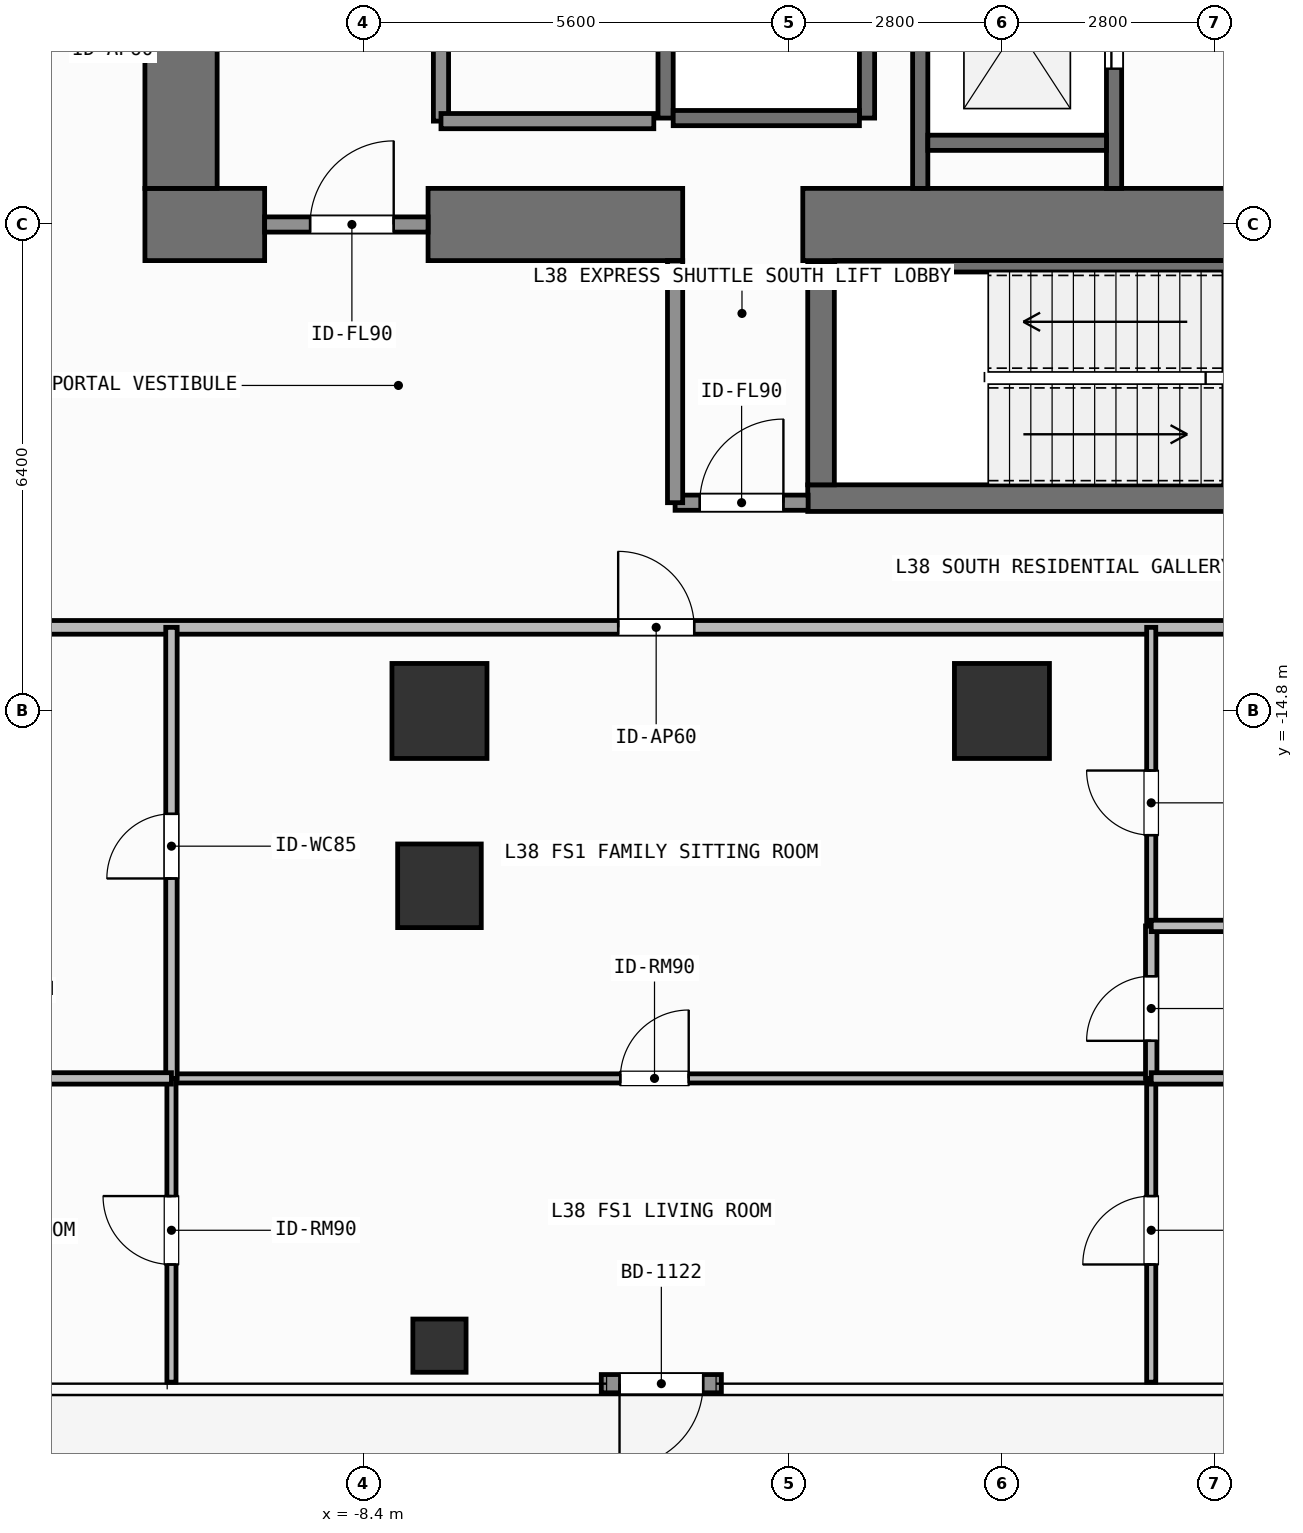
"""IFC4 building model, lengths in metres.
Left out: names, types, materials, properties, quantities, classifications, styles, units other than length and angle.
Written with IfcOpenShell. Run it as: python <this file> out.ifc"""

import sys

from ifc_helpers import new_model, si_unit, direction, frame, frame_2d, origin, origin_2d, place, context, subcontext, project, spatial, rectangle, hollow_rectangle, extrude, element, fill, save


model = new_model("IFC4")
c1 = context("Model", 3, precision=1e-05, world=origin(), true_north=direction((0.0, 1.0)))
c2 = subcontext(c1, "Body", "Model", "MODEL_VIEW")
j1 = project(units=[si_unit("LENGTHUNIT", "METRE"), si_unit("PLANEANGLEUNIT", "RADIAN")], contexts=[c1])
p1 = place(None, origin())
s1 = spatial("IfcSite", under=j1, at=p1, CompositionType="ELEMENT")
p2 = place(p1, origin())
s2 = spatial("IfcBuilding", under=s1, at=p2, CompositionType="ELEMENT")
p3 = place(p2, frame((0.0, 0.0, 152.4)))
s3 = spatial("IfcBuildingStorey", under=s2, at=p3, CompositionType="ELEMENT", Elevation=152.4)
p4 = place(p3, frame((-11.275, -8.4, 0.0), z_axis=(0.0, 0.0, 1.0), x_axis=(1.0, 0.0, 0.0)))
e1 = element("IfcWall", 1, at=p4, inside=s3, PredefinedType="SHEAR", context=c2, shape_type="SweptSolid", body=[
    extrude(rectangle(XDim=1.575, YDim=0.95, at=frame_2d((0.788, 0.0))), origin(), (0.0, 0.0, 1.0), 3.9),
])
p5 = place(p3, frame((-7.55, -8.4, 0.0), z_axis=(0.0, 0.0, 1.0), x_axis=(1.0, 0.0, 0.0)))
e2 = element("IfcWall", 2, at=p5, inside=s3, PredefinedType="SHEAR", context=c2, shape_type="SweptSolid", body=[
    extrude(rectangle(XDim=3.35, YDim=0.95, at=frame_2d((1.675, 0.0))), origin(), (0.0, 0.0, 1.0), 3.9),
])
p6 = place(p3, frame((-2.62, -8.4, 0.0), z_axis=(0.0, 0.0, 1.0), x_axis=(1.0, 0.0, 0.0)))
e3 = element("IfcWall", 3, at=p6, inside=s3, PredefinedType="SHEAR", context=c2, shape_type="SweptSolid", body=[
    extrude(rectangle(XDim=7.27, YDim=0.95, at=frame_2d((3.635, 0.0))), origin(), (0.0, 0.0, 1.0), 3.9),
])
p7 = place(p3, frame((-10.8, -7.925, 0.0), z_axis=(0.0, 0.0, 1.0), x_axis=(0.0, 1.0, 0.0)))
e4 = element("IfcWall", 4, at=p7, inside=s3, PredefinedType="SHEAR", context=c2, shape_type="SweptSolid", body=[
    extrude(rectangle(XDim=15.85, YDim=0.95, at=frame_2d((7.925, 0.0))), origin(), (0.0, 0.0, 1.0), 3.9),
])
p8 = place(p3, frame((-2.555, -12.0, 0.0), z_axis=(0.0, 0.0, 1.0), x_axis=(1.0, 0.0, 0.0)))
e5 = element("IfcWall", 5, at=p8, inside=s3, PredefinedType="SHEAR", context=c2, shape_type="SweptSolid", body=[
    extrude(rectangle(XDim=7.31, YDim=0.35, at=frame_2d((3.655, 0.0))), origin(), (0.0, 0.0, 1.0), 3.9),
])
p9 = place(p3, frame((-2.2, -8.95, 0.0), z_axis=(0.0, 0.0, 1.0), x_axis=(1.0, 0.0, 0.0)))
e6 = element("IfcWall", 6, at=p9, inside=s3, PredefinedType="SHEAR", context=c2, shape_type="SweptSolid", body=[
    extrude(rectangle(XDim=6.6, YDim=0.15, at=frame_2d((3.3, 0.0))), origin(), (0.0, 0.0, 1.0), 3.9),
])
p10 = place(p3, frame((-2.38, -11.825, 0.0), z_axis=(0.0, 0.0, 1.0), x_axis=(0.0, 1.0, 0.0)))
e7 = element("IfcWall", 7, at=p10, inside=s3, PredefinedType="SHEAR", context=c2, shape_type="SweptSolid", body=[
    extrude(rectangle(XDim=2.925, YDim=0.35, at=frame_2d((1.462, 0.0))), origin(), (0.0, 0.0, 1.0), 3.9),
])
for number, where, z_axis, x_axis in (
    (8, (-7.4, -14.8, 0.0), (0.0, 0.0, 1.0), (1.0, 0.0, 0.0)),
    (9, (0.0, -14.8, 0.0), (0.0, 0.0, 1.0), (1.0, 0.0, 0.0)),
):
    element("IfcColumn", number, at=place(p3, frame(where, z_axis=z_axis, x_axis=x_axis)), inside=s3, PredefinedType="COLUMN", context=c2, shape_type="SweptSolid", body=[
        extrude(rectangle(XDim=1.25, YDim=1.25, at=origin_2d()), origin(), (0.0, 0.0, 1.0), 3.9),
    ])
p11 = place(p3, frame((-7.4, -17.1, 0.0), z_axis=(0.0, 0.0, 1.0), x_axis=(1.0, 0.0, 0.0)))
e10 = element("IfcColumn", 10, at=p11, inside=s3, PredefinedType="COLUMN", context=c2, shape_type="SweptSolid", body=[
    extrude(rectangle(XDim=1.1, YDim=1.1, at=origin_2d()), origin(), (0.0, 0.0, 1.0), 3.9),
])
p12 = place(p3, frame((-7.4, -23.15, 0.0), z_axis=(0.0, 0.0, 1.0), x_axis=(1.0, 0.0, 0.0)))
e11 = element("IfcColumn", 11, at=p12, inside=s3, PredefinedType="COLUMN", context=c2, shape_type="SweptSolid", body=[
    extrude(hollow_rectangle(XDim=0.7, YDim=0.7, WallThickness=0.032, at=origin_2d()), origin(), (0.0, 0.0, 1.0), 3.9),
])
p13 = place(p3, frame((-3.691, -23.65, 0.0), z_axis=(0.0, 0.0, 1.0), x_axis=(-1.0, 0.0, 0.0)))
e12 = element("IfcWall", 12, at=p13, inside=s3, PredefinedType="SOLIDWALL", context=c2, shape_type="SweptSolid", body=[
    extrude(rectangle(XDim=1.58, YDim=0.24, at=frame_2d((0.79, 0.0))), origin(), (0.0, 0.0, 1.0), 3.6),
])
p14 = place(p13, frame((0.24, 0.0, 0.0)))
e13 = element("IfcOpeningElement", 13, at=p14, cuts=e12, PredefinedType="OPENING", context=c2, shape_type="SweptSolid", body=[
    extrude(rectangle(XDim=1.1, YDim=2.2, at=frame_2d((0.55, 1.1))), frame((0.0, 0.13, 0.0), z_axis=(0.0, -1.0, 0.0), x_axis=(1.0, 0.0, 0.0)), (0.0, 0.0, 1.0), 0.26),
])
for number, where, z_axis, x_axis in (
    (14, (-4.425, -7.0, 0.0), (0.0, 0.0, 1.0), (0.0, 1.0, 0.0)),
    (15, (-1.775, -7.0, 0.0), (0.0, 0.0, 1.0), (0.0, 1.0, 0.0)),
):
    element("IfcWall", number, at=place(p3, frame(where, z_axis=z_axis, x_axis=x_axis)), inside=s3, PredefinedType="SHEAR", context=c2, shape_type="SweptSolid", body=[
        extrude(rectangle(XDim=2.8, YDim=0.2, at=frame_2d((1.4, 0.0))), origin(), (0.0, 0.0, 1.0), 3.6),
    ])
p15 = place(p3, frame((-4.325, -7.0, 0.0), z_axis=(0.0, 0.0, 1.0), x_axis=(1.0, 0.0, 0.0)))
e16 = element("IfcWall", 16, at=p15, inside=s3, PredefinedType="SHEAR", context=c2, shape_type="SweptSolid", body=[
    extrude(rectangle(XDim=2.45, YDim=0.2, at=frame_2d((1.225, 0.0))), origin(), (0.0, 0.0, 1.0), 3.6),
])
p16 = place(p3, frame((-1.075, -7.925, 0.0), z_axis=(0.0, 0.0, 1.0), x_axis=(0.0, 1.0, 0.0)))
e17 = element("IfcWall", 17, at=p16, inside=s3, PredefinedType="SHEAR", context=c2, shape_type="SweptSolid", body=[
    extrude(rectangle(XDim=3.65, YDim=0.2, at=frame_2d((1.825, 0.0))), origin(), (0.0, 0.0, 1.0), 3.6),
])
p17 = place(p3, frame((1.475, -7.925, 0.0), z_axis=(0.0, 0.0, 1.0), x_axis=(0.0, 1.0, 0.0)))
e18 = element("IfcWall", 18, at=p17, inside=s3, PredefinedType="SHEAR", context=c2, shape_type="SweptSolid", body=[
    extrude(rectangle(XDim=3.65, YDim=0.2, at=frame_2d((1.825, 0.0))), origin(), (0.0, 0.0, 1.0), 3.6),
])
p18 = place(p17, frame((1.575, 0.0, 0.0)))
e19 = element("IfcOpeningElement", 19, at=p18, cuts=e18, PredefinedType="OPENING", context=c2, shape_type="SweptSolid", body=[
    extrude(rectangle(XDim=1.1, YDim=2.2, at=frame_2d((0.55, 1.1))), frame((0.0, 0.11, 0.0), z_axis=(0.0, -1.0, 0.0), x_axis=(1.0, 0.0, 0.0)), (0.0, 0.0, 1.0), 0.22),
])
p19 = place(p3, frame((-0.975, -7.325, 0.0), z_axis=(0.0, 0.0, 1.0), x_axis=(1.0, 0.0, 0.0)))
e20 = element("IfcWall", 20, at=p19, inside=s3, PredefinedType="SHEAR", context=c2, shape_type="SweptSolid", body=[
    extrude(rectangle(XDim=2.35, YDim=0.2, at=frame_2d((1.175, 0.0))), origin(), (0.0, 0.0, 1.0), 3.6),
])
p20 = place(p3, frame((-9.7, -8.4, 0.0), z_axis=(0.0, 0.0, 1.0), x_axis=(1.0, 0.0, 0.0)))
e21 = element("IfcWall", 21, at=p20, inside=s3, PredefinedType="SOLIDWALL", context=c2, shape_type="SweptSolid", body=[
    extrude(rectangle(XDim=2.15, YDim=0.2, at=frame_2d((1.075, 0.0))), origin(), (0.0, 0.0, 1.0), 2.64),
])
p21 = place(p20, frame((0.598, 0.0, 0.0)))
e22 = element("IfcOpeningElement", 22, at=p21, cuts=e21, PredefinedType="OPENING", context=c2, shape_type="SweptSolid", body=[
    extrude(rectangle(XDim=1.1, YDim=2.15, at=frame_2d((0.55, 1.075))), frame((0.0, 0.11, 0.0), z_axis=(0.0, -1.0, 0.0), x_axis=(1.0, 0.0, 0.0)), (0.0, 0.0, 1.0), 0.22),
])
p22 = place(p3, frame((-4.3, -12.06, 0.0), z_axis=(0.0, 0.0, 1.0), x_axis=(1.0, 0.0, 0.0)))
e23 = element("IfcWall", 23, at=p22, inside=s3, PredefinedType="SOLIDWALL", context=c2, shape_type="SweptSolid", body=[
    extrude(rectangle(XDim=1.75, YDim=0.2, at=frame_2d((0.875, 0.0))), origin(), (0.0, 0.0, 1.0), 3.6),
])
p23 = place(p22, frame((0.325, 0.0, 0.0)))
e24 = element("IfcOpeningElement", 24, at=p23, cuts=e23, PredefinedType="OPENING", context=c2, shape_type="SweptSolid", body=[
    extrude(rectangle(XDim=1.1, YDim=2.15, at=frame_2d((0.55, 1.075))), frame((0.0, 0.11, 0.0), z_axis=(0.0, -1.0, 0.0), x_axis=(1.0, 0.0, 0.0)), (0.0, 0.0, 1.0), 0.22),
])
p24 = place(p3, frame((-7.38, -7.04, 0.0), z_axis=(0.0, 0.0, 1.0), x_axis=(0.0, 1.0, 0.0)))
e25 = element("IfcWall", 25, at=p24, inside=s3, PredefinedType="SOLIDWALL", context=c2, shape_type="SweptSolid", body=[
    extrude(rectangle(XDim=2.9, YDim=0.2, at=frame_2d((1.45, 0.0))), origin(), (0.0, 0.0, 1.0), 3.6),
])
p25 = place(p24, frame((0.99, 0.0, 0.0)))
e26 = element("IfcOpeningElement", 26, at=p25, cuts=e25, PredefinedType="OPENING", context=c2, shape_type="SweptSolid", body=[
    extrude(rectangle(XDim=0.92, YDim=2.1, at=frame_2d((0.46, 1.05))), frame((0.0, 0.11, 0.0), z_axis=(0.0, -1.0, 0.0), x_axis=(1.0, 0.0, 0.0)), (0.0, 0.0, 1.0), 0.22),
])
p26 = place(p3, frame((-16.32, -13.7, 0.0), z_axis=(0.0, 0.0, 1.0), x_axis=(1.0, 0.0, 0.0)))
e27 = element("IfcWall", 27, at=p26, inside=s3, PredefinedType="PARTITIONING", context=c2, shape_type="SweptSolid", body=[
    extrude(rectangle(XDim=22.646, YDim=0.18, at=frame_2d((11.323, 0.0))), origin(), (0.0, 0.0, 1.0), 3.6),
])
p27 = place(p26, frame((11.271, 0.0, 0.0)))
e28 = element("IfcOpeningElement", 28, at=p27, cuts=e27, PredefinedType="OPENING", context=c2, shape_type="SweptSolid", body=[
    extrude(rectangle(XDim=1.0, YDim=2.2, at=frame_2d((0.5, 1.1))), frame((0.0, 0.1, 0.0), z_axis=(0.0, -1.0, 0.0), x_axis=(1.0, 0.0, 0.0)), (0.0, 0.0, 1.0), 0.2),
])
p28 = place(p3, frame((-10.926, -19.634, 0.0), z_axis=(0.0, 0.0, 1.0), x_axis=(1.0, 0.0, 0.0)))
e29 = element("IfcWall", 29, at=p28, inside=s3, PredefinedType="PARTITIONING", context=c2, shape_type="SweptSolid", body=[
    extrude(rectangle(XDim=12.89, YDim=0.12, at=frame_2d((6.445, 0.0))), origin(), (0.0, 0.0, 1.0), 3.6),
])
p29 = place(p28, frame((5.905, 0.0, 0.0)))
e30 = element("IfcOpeningElement", 30, at=p29, cuts=e29, PredefinedType="OPENING", context=c2, shape_type="SweptSolid", body=[
    extrude(rectangle(XDim=0.9, YDim=2.1, at=frame_2d((0.45, 1.05))), frame((0.0, 0.07, 0.0), z_axis=(0.0, -1.0, 0.0), x_axis=(1.0, 0.0, 0.0)), (0.0, 0.0, 1.0), 0.14),
])
p30 = place(p3, frame((-10.926, -19.634, 0.0), z_axis=(0.0, 0.0, 1.0), x_axis=(0.0, 1.0, 0.0)))
e31 = element("IfcWall", 31, at=p30, inside=s3, PredefinedType="PARTITIONING", context=c2, shape_type="SweptSolid", body=[
    extrude(rectangle(XDim=5.934, YDim=0.15, at=frame_2d((2.967, 0.0))), origin(), (0.0, 0.0, 1.0), 3.29),
])
p31 = place(p30, frame((2.63, 0.0, 0.0)))
e32 = element("IfcOpeningElement", 32, at=p31, cuts=e31, PredefinedType="OPENING", context=c2, shape_type="SweptSolid", body=[
    extrude(rectangle(XDim=0.85, YDim=2.1, at=frame_2d((0.425, 1.05))), frame((0.0, 0.085, 0.0), z_axis=(0.0, -1.0, 0.0), x_axis=(1.0, 0.0, 0.0)), (0.0, 0.0, 1.0), 0.17),
])
p32 = place(p3, frame((-10.926, -23.63, 0.0), z_axis=(0.0, 0.0, 1.0), x_axis=(0.0, 1.0, 0.0)))
e33 = element("IfcWall", 33, at=p32, inside=s3, PredefinedType="PARTITIONING", context=c2, shape_type="SweptSolid", body=[
    extrude(rectangle(XDim=3.996, YDim=0.12, at=frame_2d((1.998, 0.0))), origin(), (0.0, 0.0, 1.0), 3.29),
])
p33 = place(p32, frame((1.548, 0.0, 0.0)))
e34 = element("IfcOpeningElement", 34, at=p33, cuts=e33, PredefinedType="OPENING", context=c2, shape_type="SweptSolid", body=[
    extrude(rectangle(XDim=0.9, YDim=2.1, at=frame_2d((0.45, 1.05))), frame((0.0, 0.07, 0.0), z_axis=(0.0, -1.0, 0.0), x_axis=(1.0, 0.0, 0.0)), (0.0, 0.0, 1.0), 0.14),
])
p34 = place(p3, frame((1.964, -19.634, 0.0), z_axis=(0.0, 0.0, 1.0), x_axis=(0.0, 1.0, 0.0)))
e35 = element("IfcWall", 35, at=p34, inside=s3, PredefinedType="PARTITIONING", context=c2, shape_type="SweptSolid", body=[
    extrude(rectangle(XDim=2.006, YDim=0.15, at=frame_2d((1.003, 0.0))), origin(), (0.0, 0.0, 1.0), 3.6),
])
p35 = place(p34, frame((0.494, 0.0, 0.0)))
e36 = element("IfcOpeningElement", 36, at=p35, cuts=e35, PredefinedType="OPENING", context=c2, shape_type="SweptSolid", body=[
    extrude(rectangle(XDim=0.85, YDim=2.1, at=frame_2d((0.425, 1.05))), frame((0.0, 0.085, 0.0), z_axis=(0.0, -1.0, 0.0), x_axis=(1.0, 0.0, 0.0)), (0.0, 0.0, 1.0), 0.17),
])
p36 = place(p3, frame((1.964, -17.628, 0.0), z_axis=(0.0, 0.0, 1.0), x_axis=(0.0, 1.0, 0.0)))
e37 = element("IfcWall", 37, at=p36, inside=s3, PredefinedType="PARTITIONING", context=c2, shape_type="SweptSolid", body=[
    extrude(rectangle(XDim=3.928, YDim=0.12, at=frame_2d((1.964, 0.0))), origin(), (0.0, 0.0, 1.0), 3.6),
])
p37 = place(p36, frame((1.194, 0.0, 0.0)))
e38 = element("IfcOpeningElement", 38, at=p37, cuts=e37, PredefinedType="OPENING", context=c2, shape_type="SweptSolid", body=[
    extrude(rectangle(XDim=0.85, YDim=2.1, at=frame_2d((0.425, 1.05))), frame((0.0, 0.07, 0.0), z_axis=(0.0, -1.0, 0.0), x_axis=(1.0, 0.0, 0.0)), (0.0, 0.0, 1.0), 0.14),
])
p38 = place(p3, frame((1.964, -23.63, 0.0), z_axis=(0.0, 0.0, 1.0), x_axis=(0.0, 1.0, 0.0)))
e39 = element("IfcWall", 39, at=p38, inside=s3, PredefinedType="PARTITIONING", context=c2, shape_type="SweptSolid", body=[
    extrude(rectangle(XDim=3.996, YDim=0.12, at=frame_2d((1.998, 0.0))), origin(), (0.0, 0.0, 1.0), 3.6),
])
p39 = place(p38, frame((1.548, 0.0, 0.0)))
e40 = element("IfcOpeningElement", 40, at=p39, cuts=e39, PredefinedType="OPENING", context=c2, shape_type="SweptSolid", body=[
    extrude(rectangle(XDim=0.9, YDim=2.1, at=frame_2d((0.45, 1.05))), frame((0.0, 0.07, 0.0), z_axis=(0.0, -1.0, 0.0), x_axis=(1.0, 0.0, 0.0)), (0.0, 0.0, 1.0), 0.14),
])
p40 = place(p3, frame((-4.3, -12.06, 0.0), z_axis=(0.0, 0.0, 1.0), x_axis=(0.0, 1.0, 0.0)))
e41 = element("IfcWall", 41, at=p40, inside=s3, PredefinedType="SOLIDWALL", context=c2, shape_type="SweptSolid", body=[
    extrude(rectangle(XDim=3.185, YDim=0.2, at=frame_2d((1.593, 0.0))), origin(), (0.0, 0.0, 1.0), 3.6),
])
p41 = place(p3, frame((-7.38, -7.04, 0.0), z_axis=(0.0, 0.0, 1.0), x_axis=(1.0, 0.0, 0.0)))
e42 = element("IfcWall", 42, at=p41, inside=s3, PredefinedType="SOLIDWALL", context=c2, shape_type="SweptSolid", body=[
    extrude(rectangle(XDim=2.8, YDim=0.2, at=frame_2d((1.4, 0.0))), origin(), (0.0, 0.0, 1.0), 3.6),
])
p42 = place(p3, frame((-16.32, -19.634, 0.0), z_axis=(0.0, 0.0, 1.0), x_axis=(1.0, 0.0, 0.0)))
e43 = element("IfcWall", 43, at=p42, inside=s3, PredefinedType="PARTITIONING", context=c2, shape_type="SweptSolid", body=[
    extrude(rectangle(XDim=5.394, YDim=0.15, at=frame_2d((2.697, 0.0))), origin(), (0.0, 0.0, 1.0), 3.6),
])
for number, where, z_axis, x_axis in (
    (44, (1.964, -17.628, 0.0), (0.0, 0.0, 1.0), (1.0, 0.0, 0.0)),
    (45, (1.964, -19.634, 0.0), (0.0, 0.0, 1.0), (1.0, 0.0, 0.0)),
):
    element("IfcWall", number, at=place(p3, frame(where, z_axis=z_axis, x_axis=x_axis)), inside=s3, PredefinedType="PARTITIONING", context=c2, shape_type="SweptSolid", body=[
        extrude(rectangle(XDim=4.362, YDim=0.15, at=frame_2d((2.181, 0.0))), origin(), (0.0, 0.0, 1.0), 3.6),
    ])
p43 = place(p14, origin())
e46 = element("IfcDoor", 46, at=p43, inside=s3, OperationType="SINGLE_SWING_RIGHT", PredefinedType="DOOR", context=c2, shape_type="SweptSolid", body=[
    extrude(rectangle(XDim=1.1, YDim=2.2, at=frame_2d((0.55, 1.1))), frame((0.0, 0.025, 0.0), z_axis=(0.0, -1.0, 0.0), x_axis=(1.0, 0.0, 0.0)), (0.0, 0.0, 1.0), 0.05),
])
fill(e13, e46)
p44 = place(p18, origin())
e47 = element("IfcDoor", 47, at=p44, inside=s3, OperationType="SLIDING_TO_LEFT", PredefinedType="DOOR", context=c2, shape_type="SweptSolid", body=[
    extrude(rectangle(XDim=1.1, YDim=2.2, at=frame_2d((0.55, 1.1))), frame((0.0, 0.025, 0.0), z_axis=(0.0, -1.0, 0.0), x_axis=(1.0, 0.0, 0.0)), (0.0, 0.0, 1.0), 0.05),
])
fill(e19, e47)
p45 = place(p21, origin())
e48 = element("IfcDoor", 48, at=p45, inside=s3, OperationType="SINGLE_SWING_RIGHT", PredefinedType="DOOR", context=c2, shape_type="SweptSolid", body=[
    extrude(rectangle(XDim=1.1, YDim=2.15, at=frame_2d((0.55, 1.075))), frame((0.0, 0.025, 0.0), z_axis=(0.0, -1.0, 0.0), x_axis=(1.0, 0.0, 0.0)), (0.0, 0.0, 1.0), 0.05),
])
fill(e22, e48)
p46 = place(p23, origin())
e49 = element("IfcDoor", 49, at=p46, inside=s3, OperationType="SINGLE_SWING_RIGHT", PredefinedType="DOOR", context=c2, shape_type="SweptSolid", body=[
    extrude(rectangle(XDim=1.1, YDim=2.15, at=frame_2d((0.55, 1.075))), frame((0.0, 0.025, 0.0), z_axis=(0.0, -1.0, 0.0), x_axis=(1.0, 0.0, 0.0)), (0.0, 0.0, 1.0), 0.05),
])
fill(e24, e49)
p47 = place(p27, origin())
e50 = element("IfcDoor", 50, at=p47, inside=s3, OperationType="SINGLE_SWING_LEFT", PredefinedType="DOOR", context=c2, shape_type="SweptSolid", body=[
    extrude(rectangle(XDim=1.0, YDim=2.2, at=frame_2d((0.5, 1.1))), frame((0.0, 0.025, 0.0), z_axis=(0.0, -1.0, 0.0), x_axis=(1.0, 0.0, 0.0)), (0.0, 0.0, 1.0), 0.05),
])
fill(e28, e50)
p48 = place(p29, origin())
e51 = element("IfcDoor", 51, at=p48, inside=s3, OperationType="SINGLE_SWING_RIGHT", PredefinedType="DOOR", context=c2, shape_type="SweptSolid", body=[
    extrude(rectangle(XDim=0.9, YDim=2.1, at=frame_2d((0.45, 1.05))), frame((0.0, 0.025, 0.0), z_axis=(0.0, -1.0, 0.0), x_axis=(1.0, 0.0, 0.0)), (0.0, 0.0, 1.0), 0.05),
])
fill(e30, e51)
p49 = place(p31, origin())
e52 = element("IfcDoor", 52, at=p49, inside=s3, OperationType="SINGLE_SWING_LEFT", PredefinedType="DOOR", context=c2, shape_type="SweptSolid", body=[
    extrude(rectangle(XDim=0.85, YDim=2.1, at=frame_2d((0.425, 1.05))), frame((0.0, 0.025, 0.0), z_axis=(0.0, -1.0, 0.0), x_axis=(1.0, 0.0, 0.0)), (0.0, 0.0, 1.0), 0.05),
])
fill(e32, e52)
p50 = place(p33, origin())
e53 = element("IfcDoor", 53, at=p50, inside=s3, OperationType="SINGLE_SWING_RIGHT", PredefinedType="DOOR", context=c2, shape_type="SweptSolid", body=[
    extrude(rectangle(XDim=0.9, YDim=2.1, at=frame_2d((0.45, 1.05))), frame((0.0, 0.025, 0.0), z_axis=(0.0, -1.0, 0.0), x_axis=(1.0, 0.0, 0.0)), (0.0, 0.0, 1.0), 0.05),
])
fill(e34, e53)
p51 = place(p35, origin())
e54 = element("IfcDoor", 54, at=p51, inside=s3, OperationType="SINGLE_SWING_LEFT", PredefinedType="DOOR", context=c2, shape_type="SweptSolid", body=[
    extrude(rectangle(XDim=0.85, YDim=2.1, at=frame_2d((0.425, 1.05))), frame((0.0, 0.025, 0.0), z_axis=(0.0, -1.0, 0.0), x_axis=(1.0, 0.0, 0.0)), (0.0, 0.0, 1.0), 0.05),
])
fill(e36, e54)
p52 = place(p37, origin())
e55 = element("IfcDoor", 55, at=p52, inside=s3, OperationType="SINGLE_SWING_RIGHT", PredefinedType="DOOR", context=c2, shape_type="SweptSolid", body=[
    extrude(rectangle(XDim=0.85, YDim=2.1, at=frame_2d((0.425, 1.05))), frame((0.0, 0.025, 0.0), z_axis=(0.0, -1.0, 0.0), x_axis=(1.0, 0.0, 0.0)), (0.0, 0.0, 1.0), 0.05),
])
fill(e38, e55)
p53 = place(p39, origin())
e56 = element("IfcDoor", 56, at=p53, inside=s3, OperationType="SINGLE_SWING_LEFT", PredefinedType="DOOR", context=c2, shape_type="SweptSolid", body=[
    extrude(rectangle(XDim=0.9, YDim=2.1, at=frame_2d((0.45, 1.05))), frame((0.0, 0.025, 0.0), z_axis=(0.0, -1.0, 0.0), x_axis=(1.0, 0.0, 0.0)), (0.0, 0.0, 1.0), 0.05),
])
fill(e40, e56)
save(model, sys.argv[1])
